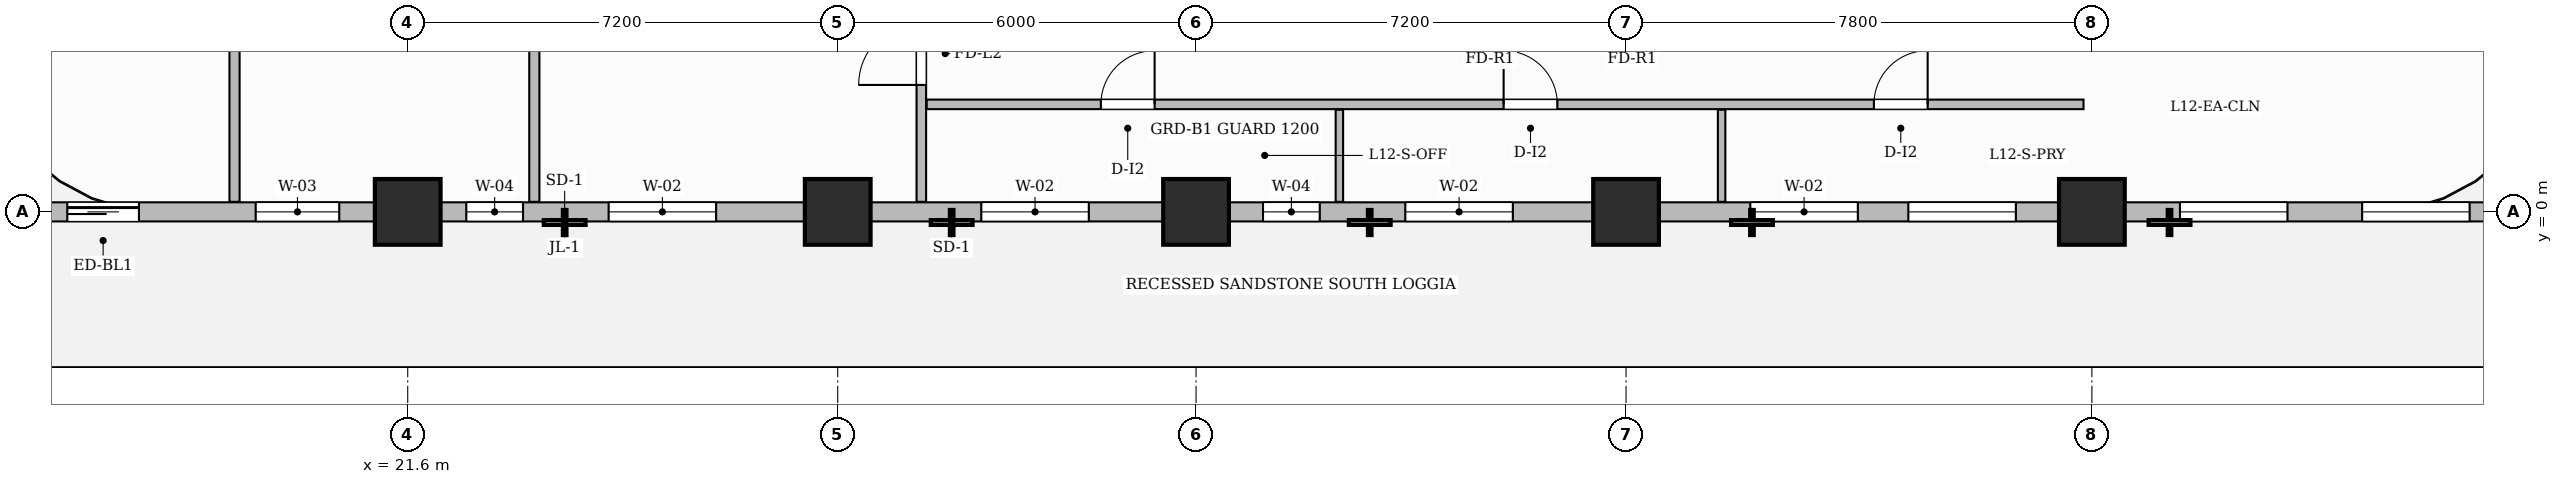
"""IFC4 building model, lengths in metres.
Left out: names, types, materials, properties, quantities, classifications, styles, units other than length and angle.
Written with IfcOpenShell. Run it as: python <this file> out.ifc"""

import sys

from ifc_helpers import new_model, si_unit, direction, frame, frame_2d, origin, origin_2d, place, context, subcontext, project, spatial, rectangle, extrude, source, transform, mapped, element, fill, save


model = new_model("IFC4")
c1 = context("Model", 3, precision=1e-05, world=origin(), true_north=direction((0.0, 1.0)))
c2 = subcontext(c1, "Body", "Model", "MODEL_VIEW")
j1 = project(units=[si_unit("LENGTHUNIT", "METRE"), si_unit("PLANEANGLEUNIT", "RADIAN")], contexts=[c1])
p1 = place(None, origin())
s1 = spatial("IfcSite", under=j1, at=p1, CompositionType="ELEMENT")
p2 = place(p1, origin())
s2 = spatial("IfcBuilding", under=s1, at=p2, CompositionType="ELEMENT")
p3 = place(p2, frame((0.0, 0.0, 54.6)))
s3 = spatial("IfcBuildingStorey", under=s2, at=p3, CompositionType="ELEMENT", Elevation=54.6)
m1 = source(origin(), c2, "Body", "SweptSolid", [
    extrude(rectangle(XDim=1.1, YDim=1.1, at=origin_2d()), origin(), (0.0, 0.0, 1.0), 3.7),
])
for number, where, z_axis, x_axis in (
    (1, (21.6, 0.0, 0.0), (0.0, 0.0, 1.0), (1.0, 0.0, 0.0)),
    (2, (28.8, 0.0, 0.0), (0.0, 0.0, 1.0), (1.0, 0.0, 0.0)),
    (3, (34.8, 0.0, 0.0), (0.0, 0.0, 1.0), (1.0, 0.0, 0.0)),
    (4, (42.0, 0.0, 0.0), (0.0, 0.0, 1.0), (1.0, 0.0, 0.0)),
    (5, (49.8, 0.0, 0.0), (0.0, 0.0, 1.0), (1.0, 0.0, 0.0)),
):
    element("IfcColumn", number, at=place(p3, frame(where, z_axis=z_axis, x_axis=x_axis)), inside=s3, PredefinedType="COLUMN", context=c2, shape_type="MappedRepresentation", body=[
        mapped(m1, transform((0.0, 0.0, 0.0), scale=1.0)),
    ])
p4 = place(p3, frame((30.2, 0.168, 0.0), z_axis=(0.0, 0.0, 1.0), x_axis=(0.0, 1.0, 0.0)))
e6 = element("IfcWall", 6, at=p4, inside=s3, PredefinedType="PARTITIONING", context=c2, shape_type="SweptSolid", body=[
    extrude(rectangle(XDim=10.092, YDim=0.16, at=frame_2d((5.046, 0.0))), origin(), (0.0, 0.0, 1.0), 3.45),
])
p5 = place(p4, frame((1.957, 0.0, 0.0)))
e7 = element("IfcOpeningElement", 7, at=p5, cuts=e6, PredefinedType="OPENING", context=c2, shape_type="SweptSolid", body=[
    extrude(rectangle(XDim=1.05, YDim=2.15, at=frame_2d((0.525, 1.075))), frame((0.0, 0.09, 0.0), z_axis=(0.0, -1.0, 0.0), x_axis=(1.0, 0.0, 0.0)), (0.0, 0.0, 1.0), 0.18),
])
p6 = place(p3, frame((30.29, 1.8, 0.0), z_axis=(0.0, 0.0, 1.0), x_axis=(1.0, 0.0, 0.0)))
e8 = element("IfcWall", 8, at=p6, inside=s3, PredefinedType="PARTITIONING", context=c2, shape_type="SweptSolid", body=[
    extrude(rectangle(XDim=19.37, YDim=0.16, at=frame_2d((9.685, 0.0))), origin(), (0.0, 0.0, 1.0), 3.45),
])
p7 = place(p6, frame((2.916, 0.0, 0.0)))
e9 = element("IfcOpeningElement", 9, at=p7, cuts=e8, PredefinedType="OPENING", context=c2, shape_type="SweptSolid", body=[
    extrude(rectangle(XDim=0.9, YDim=2.15, at=frame_2d((0.45, 1.075))), frame((0.0, 0.09, 0.0), z_axis=(0.0, -1.0, 0.0), x_axis=(1.0, 0.0, 0.0)), (0.0, 0.0, 1.0), 0.18),
])
p8 = place(p6, frame((9.66, 0.0, 0.0)))
e10 = element("IfcOpeningElement", 10, at=p8, cuts=e8, PredefinedType="OPENING", context=c2, shape_type="SweptSolid", body=[
    extrude(rectangle(XDim=0.9, YDim=2.15, at=frame_2d((0.45, 1.075))), frame((0.0, 0.09, 0.0), z_axis=(0.0, -1.0, 0.0), x_axis=(1.0, 0.0, 0.0)), (0.0, 0.0, 1.0), 0.18),
])
p9 = place(p6, frame((15.86, 0.0, 0.0)))
e11 = element("IfcOpeningElement", 11, at=p9, cuts=e8, PredefinedType="OPENING", context=c2, shape_type="SweptSolid", body=[
    extrude(rectangle(XDim=0.9, YDim=2.15, at=frame_2d((0.45, 1.075))), frame((0.0, 0.09, 0.0), z_axis=(0.0, -1.0, 0.0), x_axis=(1.0, 0.0, 0.0)), (0.0, 0.0, 1.0), 0.18),
])
for number, where, z_axis, x_axis in (
    (12, (37.2, 0.168, 0.0), (0.0, 0.0, 1.0), (0.0, 1.0, 0.0)),
    (13, (43.6, 0.168, 0.0), (0.0, 0.0, 1.0), (0.0, 1.0, 0.0)),
):
    element("IfcWall", number, at=place(p3, frame(where, z_axis=z_axis, x_axis=x_axis)), inside=s3, PredefinedType="PARTITIONING", context=c2, shape_type="SweptSolid", body=[
        extrude(rectangle(XDim=1.542, YDim=0.125, at=frame_2d((0.771, 0.0))), origin(), (0.0, 0.0, 1.0), 3.45),
    ])
for number, where, z_axis, x_axis in (
    (14, (18.7, 0.168, 0.0), (0.0, 0.0, 1.0), (0.0, 1.0, 0.0)),
    (15, (23.72, 0.168, 0.0), (0.0, 0.0, 1.0), (0.0, 1.0, 0.0)),
):
    element("IfcWall", number, at=place(p3, frame(where, z_axis=z_axis, x_axis=x_axis)), inside=s3, PredefinedType="PARTITIONING", context=c2, shape_type="SweptSolid", body=[
        extrude(rectangle(XDim=10.092, YDim=0.17, at=frame_2d((5.046, 0.0))), origin(), (0.0, 0.0, 1.0), 3.45),
    ])
p10 = place(p3, frame((14.4, 0.0, 0.0), z_axis=(0.0, 0.0, 1.0), x_axis=(1.0, 0.0, 0.0)))
e16 = element("IfcWall", 16, at=p10, inside=s3, PredefinedType="SOLIDWALL", context=c2, shape_type="SweptSolid", body=[
    extrude(rectangle(XDim=43.2, YDim=0.32, at=frame_2d((21.6, 0.0))), origin(), (0.0, 0.0, 1.0), 2.885),
])
p11 = place(p10, frame((1.5, 0.0, 0.0)))
e17 = element("IfcOpeningElement", 17, at=p11, cuts=e16, PredefinedType="OPENING", context=c2, shape_type="SweptSolid", body=[
    extrude(rectangle(XDim=1.2, YDim=2.2, at=frame_2d((0.6, 1.1))), frame((0.0, 0.17, 0.0), z_axis=(0.0, -1.0, 0.0), x_axis=(1.0, 0.0, 0.0)), (0.0, 0.0, 1.0), 0.34),
])
p12 = place(p10, frame((4.654, 0.0, 0.8)))
e18 = element("IfcOpeningElement", 18, at=p12, cuts=e16, PredefinedType="OPENING", context=c2, shape_type="SweptSolid", body=[
    extrude(rectangle(XDim=1.4, YDim=1.85, at=frame_2d((0.7, 0.925))), frame((0.0, 0.17, 0.0), z_axis=(0.0, -1.0, 0.0), x_axis=(1.0, 0.0, 0.0)), (0.0, 0.0, 1.0), 0.34),
])
p13 = place(p10, frame((8.181, 0.0, 0.8)))
e19 = element("IfcOpeningElement", 19, at=p13, cuts=e16, PredefinedType="OPENING", context=c2, shape_type="SweptSolid", body=[
    extrude(rectangle(XDim=0.95, YDim=1.75, at=frame_2d((0.475, 0.875))), frame((0.0, 0.17, 0.0), z_axis=(0.0, -1.0, 0.0), x_axis=(1.0, 0.0, 0.0)), (0.0, 0.0, 1.0), 0.34),
])
p14 = place(p10, frame((10.564, 0.0, 0.8)))
e20 = element("IfcOpeningElement", 20, at=p14, cuts=e16, PredefinedType="OPENING", context=c2, shape_type="SweptSolid", body=[
    extrude(rectangle(XDim=1.8, YDim=1.85, at=frame_2d((0.9, 0.925))), frame((0.0, 0.17, 0.0), z_axis=(0.0, -1.0, 0.0), x_axis=(1.0, 0.0, 0.0)), (0.0, 0.0, 1.0), 0.34),
])
p15 = place(p10, frame((16.804, 0.0, 0.8)))
e21 = element("IfcOpeningElement", 21, at=p15, cuts=e16, PredefinedType="OPENING", context=c2, shape_type="SweptSolid", body=[
    extrude(rectangle(XDim=1.8, YDim=1.85, at=frame_2d((0.9, 0.925))), frame((0.0, 0.17, 0.0), z_axis=(0.0, -1.0, 0.0), x_axis=(1.0, 0.0, 0.0)), (0.0, 0.0, 1.0), 0.34),
])
p16 = place(p10, frame((21.521, 0.0, 0.8)))
e22 = element("IfcOpeningElement", 22, at=p16, cuts=e16, PredefinedType="OPENING", context=c2, shape_type="SweptSolid", body=[
    extrude(rectangle(XDim=0.95, YDim=1.75, at=frame_2d((0.475, 0.875))), frame((0.0, 0.17, 0.0), z_axis=(0.0, -1.0, 0.0), x_axis=(1.0, 0.0, 0.0)), (0.0, 0.0, 1.0), 0.34),
])
p17 = place(p10, frame((23.904, 0.0, 0.8)))
e23 = element("IfcOpeningElement", 23, at=p17, cuts=e16, PredefinedType="OPENING", context=c2, shape_type="SweptSolid", body=[
    extrude(rectangle(XDim=1.8, YDim=1.85, at=frame_2d((0.9, 0.925))), frame((0.0, 0.17, 0.0), z_axis=(0.0, -1.0, 0.0), x_axis=(1.0, 0.0, 0.0)), (0.0, 0.0, 1.0), 0.34),
])
p18 = place(p10, frame((29.681, 0.0, 0.8)))
e24 = element("IfcOpeningElement", 24, at=p18, cuts=e16, PredefinedType="OPENING", context=c2, shape_type="SweptSolid", body=[
    extrude(rectangle(XDim=1.8, YDim=1.85, at=frame_2d((0.9, 0.925))), frame((0.0, 0.17, 0.0), z_axis=(0.0, -1.0, 0.0), x_axis=(1.0, 0.0, 0.0)), (0.0, 0.0, 1.0), 0.34),
])
p19 = place(p10, frame((32.327, 0.0, 0.8)))
e25 = element("IfcOpeningElement", 25, at=p19, cuts=e16, PredefinedType="OPENING", context=c2, shape_type="SweptSolid", body=[
    extrude(rectangle(XDim=1.8, YDim=1.85, at=frame_2d((0.9, 0.925))), frame((0.0, 0.17, 0.0), z_axis=(0.0, -1.0, 0.0), x_axis=(1.0, 0.0, 0.0)), (0.0, 0.0, 1.0), 0.34),
])
p20 = place(p10, frame((36.875, 0.0, 0.8)))
e26 = element("IfcOpeningElement", 26, at=p20, cuts=e16, PredefinedType="OPENING", context=c2, shape_type="SweptSolid", body=[
    extrude(rectangle(XDim=1.8, YDim=1.85, at=frame_2d((0.9, 0.925))), frame((0.0, 0.17, 0.0), z_axis=(0.0, -1.0, 0.0), x_axis=(1.0, 0.0, 0.0)), (0.0, 0.0, 1.0), 0.34),
])
p21 = place(p10, frame((39.925, 0.0, 0.8)))
e27 = element("IfcOpeningElement", 27, at=p21, cuts=e16, PredefinedType="OPENING", context=c2, shape_type="SweptSolid", body=[
    extrude(rectangle(XDim=1.8, YDim=1.85, at=frame_2d((0.9, 0.925))), frame((0.0, 0.17, 0.0), z_axis=(0.0, -1.0, 0.0), x_axis=(1.0, 0.0, 0.0)), (0.0, 0.0, 1.0), 0.34),
])
m2 = source(origin(), c2, "Body", "SweptSolid", [
    extrude(rectangle(XDim=1.05, YDim=2.15, at=frame_2d((0.525, 1.075))), frame((0.0, 0.025, 0.0), z_axis=(0.0, -1.0, 0.0), x_axis=(1.0, 0.0, 0.0)), (0.0, 0.0, 1.0), 0.05),
])
p22 = place(p5, origin())
e28 = element("IfcDoor", 28, at=p22, inside=s3, OperationType="SINGLE_SWING_LEFT", PredefinedType="DOOR", context=c2, shape_type="MappedRepresentation", body=[
    mapped(m2, transform((0.0, 0.0, 0.0), scale=1.0)),
])
fill(e7, e28)
m3 = source(origin(), c2, "Body", "SweptSolid", [
    extrude(rectangle(XDim=0.9, YDim=2.15, at=frame_2d((0.45, 1.075))), frame((0.0, 0.025, 0.0), z_axis=(0.0, -1.0, 0.0), x_axis=(1.0, 0.0, 0.0)), (0.0, 0.0, 1.0), 0.05),
])
p23 = place(p7, origin())
e29 = element("IfcDoor", 29, at=p23, inside=s3, OperationType="SINGLE_SWING_RIGHT", PredefinedType="DOOR", context=c2, shape_type="MappedRepresentation", body=[
    mapped(m3, transform((0.0, 0.0, 0.0), scale=1.0)),
])
fill(e9, e29)
p24 = place(p8, origin())
e30 = element("IfcDoor", 30, at=p24, inside=s3, OperationType="SINGLE_SWING_LEFT", PredefinedType="DOOR", context=c2, shape_type="MappedRepresentation", body=[
    mapped(m3, transform((0.0, 0.0, 0.0), scale=1.0)),
])
fill(e10, e30)
p25 = place(p9, origin())
e31 = element("IfcDoor", 31, at=p25, inside=s3, OperationType="SINGLE_SWING_RIGHT", PredefinedType="DOOR", context=c2, shape_type="MappedRepresentation", body=[
    mapped(m3, transform((0.0, 0.0, 0.0), scale=1.0)),
])
fill(e11, e31)
m4 = source(origin(), c2, "Body", "SweptSolid", [
    extrude(rectangle(XDim=1.2, YDim=2.2, at=frame_2d((0.6, 1.1))), frame((0.0, 0.025, 0.0), z_axis=(0.0, -1.0, 0.0), x_axis=(1.0, 0.0, 0.0)), (0.0, 0.0, 1.0), 0.05),
])
p26 = place(p11, origin())
e32 = element("IfcDoor", 32, at=p26, inside=s3, OperationType="SLIDING_TO_LEFT", PredefinedType="DOOR", context=c2, shape_type="MappedRepresentation", body=[
    mapped(m4, transform((0.0, 0.0, 0.0), scale=1.0)),
])
fill(e17, e32)
m5 = source(origin(), c2, "Body", "SweptSolid", [
    extrude(rectangle(XDim=1.4, YDim=1.85, at=frame_2d((0.7, 0.925))), frame((0.0, 0.03, 0.0), z_axis=(0.0, -1.0, 0.0), x_axis=(1.0, 0.0, 0.0)), (0.0, 0.0, 1.0), 0.06),
])
p27 = place(p12, origin())
e33 = element("IfcWindow", 33, at=p27, inside=s3, PartitioningType="SINGLE_PANEL", PredefinedType="WINDOW", context=c2, shape_type="MappedRepresentation", body=[
    mapped(m5, transform((0.0, 0.0, 0.0), scale=1.0)),
])
fill(e18, e33)
m6 = source(origin(), c2, "Body", "SweptSolid", [
    extrude(rectangle(XDim=0.95, YDim=1.75, at=frame_2d((0.475, 0.875))), frame((0.0, 0.03, 0.0), z_axis=(0.0, -1.0, 0.0), x_axis=(1.0, 0.0, 0.0)), (0.0, 0.0, 1.0), 0.06),
])
p28 = place(p13, origin())
e34 = element("IfcWindow", 34, at=p28, inside=s3, PartitioningType="SINGLE_PANEL", PredefinedType="WINDOW", context=c2, shape_type="MappedRepresentation", body=[
    mapped(m6, transform((0.0, 0.0, 0.0), scale=1.0)),
])
fill(e19, e34)
m7 = source(origin(), c2, "Body", "SweptSolid", [
    extrude(rectangle(XDim=1.8, YDim=1.85, at=frame_2d((0.9, 0.925))), frame((0.0, 0.03, 0.0), z_axis=(0.0, -1.0, 0.0), x_axis=(1.0, 0.0, 0.0)), (0.0, 0.0, 1.0), 0.06),
])
p29 = place(p14, origin())
e35 = element("IfcWindow", 35, at=p29, inside=s3, PartitioningType="DOUBLE_PANEL_VERTICAL", PredefinedType="WINDOW", context=c2, shape_type="MappedRepresentation", body=[
    mapped(m7, transform((0.0, 0.0, 0.0), scale=1.0)),
])
fill(e20, e35)
p30 = place(p15, origin())
e36 = element("IfcWindow", 36, at=p30, inside=s3, PartitioningType="DOUBLE_PANEL_VERTICAL", PredefinedType="WINDOW", context=c2, shape_type="MappedRepresentation", body=[
    mapped(m7, transform((0.0, 0.0, 0.0), scale=1.0)),
])
fill(e21, e36)
p31 = place(p16, origin())
e37 = element("IfcWindow", 37, at=p31, inside=s3, PartitioningType="SINGLE_PANEL", PredefinedType="WINDOW", context=c2, shape_type="MappedRepresentation", body=[
    mapped(m6, transform((0.0, 0.0, 0.0), scale=1.0)),
])
fill(e22, e37)
p32 = place(p17, origin())
e38 = element("IfcWindow", 38, at=p32, inside=s3, PartitioningType="DOUBLE_PANEL_VERTICAL", PredefinedType="WINDOW", context=c2, shape_type="MappedRepresentation", body=[
    mapped(m7, transform((0.0, 0.0, 0.0), scale=1.0)),
])
fill(e23, e38)
p33 = place(p18, origin())
e39 = element("IfcWindow", 39, at=p33, inside=s3, PartitioningType="DOUBLE_PANEL_VERTICAL", PredefinedType="WINDOW", context=c2, shape_type="MappedRepresentation", body=[
    mapped(m7, transform((0.0, 0.0, 0.0), scale=1.0)),
])
fill(e24, e39)
p34 = place(p19, origin())
e40 = element("IfcWindow", 40, at=p34, inside=s3, PartitioningType="DOUBLE_PANEL_VERTICAL", PredefinedType="WINDOW", context=c2, shape_type="MappedRepresentation", body=[
    mapped(m7, transform((0.0, 0.0, 0.0), scale=1.0)),
])
fill(e25, e40)
p35 = place(p20, origin())
e41 = element("IfcWindow", 41, at=p35, inside=s3, PartitioningType="DOUBLE_PANEL_VERTICAL", PredefinedType="WINDOW", context=c2, shape_type="MappedRepresentation", body=[
    mapped(m7, transform((0.0, 0.0, 0.0), scale=1.0)),
])
fill(e26, e41)
p36 = place(p21, origin())
e42 = element("IfcWindow", 42, at=p36, inside=s3, PartitioningType="DOUBLE_PANEL_VERTICAL", PredefinedType="WINDOW", context=c2, shape_type="MappedRepresentation", body=[
    mapped(m7, transform((0.0, 0.0, 0.0), scale=1.0)),
])
fill(e27, e42)
save(model, sys.argv[1])
